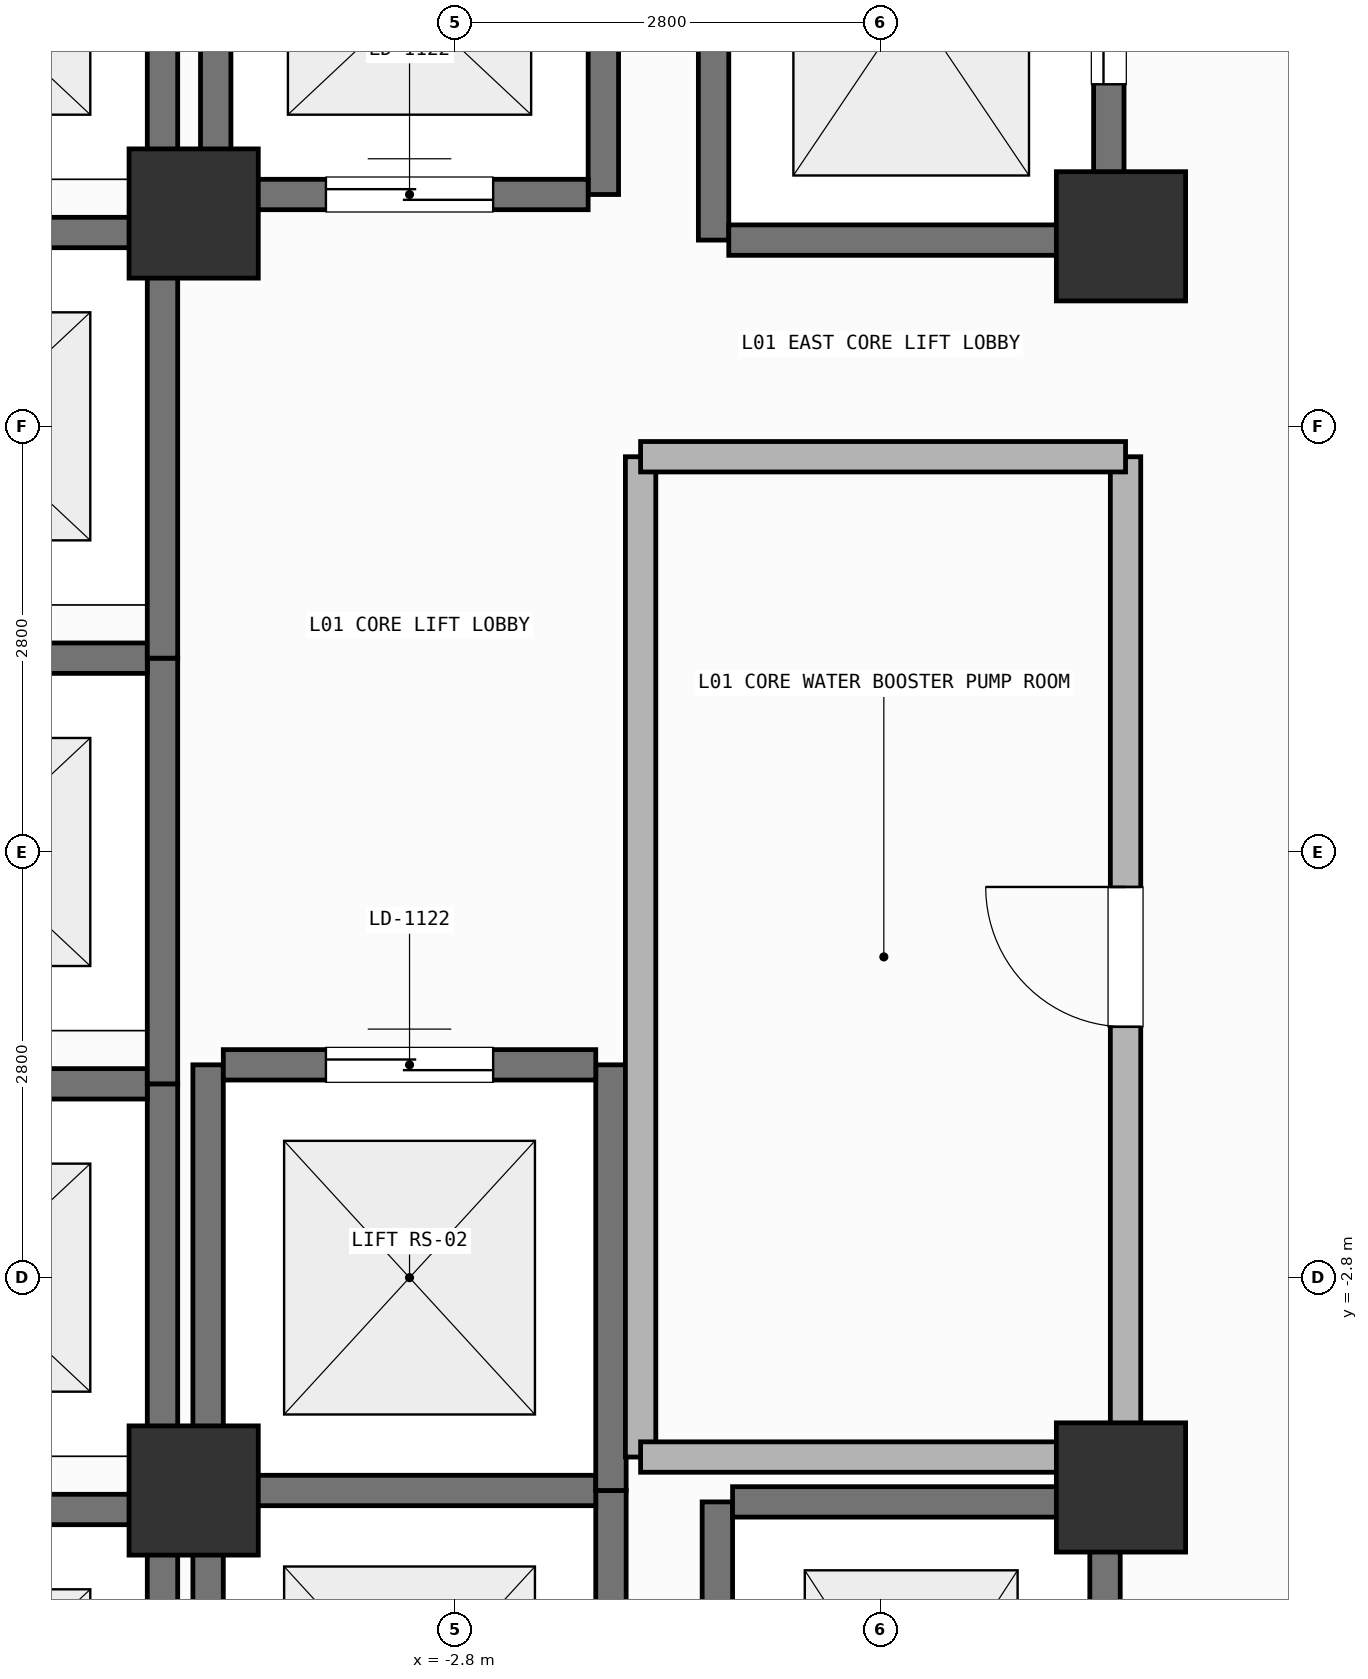
"""IFC4 building model, lengths in metres.
Left out: names, types, materials, properties, quantities, classifications, styles, units other than length and angle.
Written with IfcOpenShell. Run it as: python <this file> out.ifc"""

import sys

from ifc_helpers import new_model, si_unit, direction, frame, frame_2d, origin, origin_2d, place, context, subcontext, project, spatial, rectangle, extrude, element, fill, save


model = new_model("IFC4")
c1 = context("Model", 3, precision=1e-05, world=origin(), true_north=direction((0.0, 1.0)))
c2 = subcontext(c1, "Body", "Model", "MODEL_VIEW")
j1 = project(units=[si_unit("LENGTHUNIT", "METRE"), si_unit("PLANEANGLEUNIT", "RADIAN")], contexts=[c1])
p1 = place(None, origin())
s1 = spatial("IfcSite", under=j1, at=p1, CompositionType="ELEMENT")
p2 = place(p1, origin())
s2 = spatial("IfcBuilding", under=s1, at=p2, CompositionType="ELEMENT")
p3 = place(p2, origin())
s3 = spatial("IfcBuildingStorey", under=s2, at=p3, CompositionType="ELEMENT", Elevation=0.0)
for number, where, z_axis, x_axis in (
    (1, (-4.52, -4.2, 0.0), (0.0, 0.0, 1.0), (1.0, 0.0, 0.0)),
    (2, (1.58, -4.18, 0.0), (0.0, 0.0, 1.0), (1.0, 0.0, 0.0)),
    (3, (1.58, 4.05, 0.0), (0.0, 0.0, 1.0), (1.0, 0.0, 0.0)),
    (4, (-4.52, 4.2, 0.0), (0.0, 0.0, 1.0), (1.0, 0.0, 0.0)),
):
    element("IfcColumn", number, at=place(p3, frame(where, z_axis=z_axis, x_axis=x_axis)), inside=s3, PredefinedType="COLUMN", context=c2, shape_type="SweptSolid", body=[
        extrude(rectangle(XDim=0.85, YDim=0.85, at=origin_2d()), origin(), (0.0, 0.0, 1.0), 4.8),
    ])
p4 = place(p3, frame((-4.725, -6.875, 0.0), z_axis=(0.0, 0.0, 1.0), x_axis=(0.0, 1.0, 0.0)))
e5 = element("IfcWall", 5, at=p4, inside=s3, PredefinedType="SHEAR", context=c2, shape_type="SweptSolid", body=[
    extrude(rectangle(XDim=2.55, YDim=0.2, at=frame_2d((1.275, 0.0))), origin(), (0.0, 0.0, 1.0), 4.56),
])
p5 = place(p3, frame((-7.175, -4.325, 0.0), z_axis=(0.0, 0.0, 1.0), x_axis=(1.0, 0.0, 0.0)))
e6 = element("IfcWall", 6, at=p5, inside=s3, PredefinedType="SHEAR", context=c2, shape_type="SweptSolid", body=[
    extrude(rectangle(XDim=2.35, YDim=0.2, at=frame_2d((1.175, 0.0))), origin(), (0.0, 0.0, 1.0), 4.56),
])
p6 = place(p3, frame((-4.725, -4.325, 0.0), z_axis=(0.0, 0.0, 1.0), x_axis=(0.0, 1.0, 0.0)))
e7 = element("IfcWall", 7, at=p6, inside=s3, PredefinedType="SHEAR", context=c2, shape_type="SweptSolid", body=[
    extrude(rectangle(XDim=2.8, YDim=0.2, at=frame_2d((1.4, 0.0))), origin(), (0.0, 0.0, 1.0), 4.56),
])
p7 = place(p3, frame((-7.175, -1.525, 0.0), z_axis=(0.0, 0.0, 1.0), x_axis=(1.0, 0.0, 0.0)))
e8 = element("IfcWall", 8, at=p7, inside=s3, PredefinedType="SHEAR", context=c2, shape_type="SweptSolid", body=[
    extrude(rectangle(XDim=2.35, YDim=0.2, at=frame_2d((1.175, 0.0))), origin(), (0.0, 0.0, 1.0), 4.56),
])
p8 = place(p3, frame((-4.725, -1.525, 0.0), z_axis=(0.0, 0.0, 1.0), x_axis=(0.0, 1.0, 0.0)))
e9 = element("IfcWall", 9, at=p8, inside=s3, PredefinedType="SHEAR", context=c2, shape_type="SweptSolid", body=[
    extrude(rectangle(XDim=2.8, YDim=0.2, at=frame_2d((1.4, 0.0))), origin(), (0.0, 0.0, 1.0), 4.56),
])
p9 = place(p3, frame((-7.175, 1.275, 0.0), z_axis=(0.0, 0.0, 1.0), x_axis=(1.0, 0.0, 0.0)))
e10 = element("IfcWall", 10, at=p9, inside=s3, PredefinedType="SHEAR", context=c2, shape_type="SweptSolid", body=[
    extrude(rectangle(XDim=2.35, YDim=0.2, at=frame_2d((1.175, 0.0))), origin(), (0.0, 0.0, 1.0), 4.56),
])
p10 = place(p3, frame((-4.725, 1.275, 0.0), z_axis=(0.0, 0.0, 1.0), x_axis=(0.0, 1.0, 0.0)))
e11 = element("IfcWall", 11, at=p10, inside=s3, PredefinedType="SHEAR", context=c2, shape_type="SweptSolid", body=[
    extrude(rectangle(XDim=2.8, YDim=0.2, at=frame_2d((1.4, 0.0))), origin(), (0.0, 0.0, 1.0), 4.56),
])
p11 = place(p3, frame((-7.175, 4.075, 0.0), z_axis=(0.0, 0.0, 1.0), x_axis=(1.0, 0.0, 0.0)))
e12 = element("IfcWall", 12, at=p11, inside=s3, PredefinedType="SHEAR", context=c2, shape_type="SweptSolid", body=[
    extrude(rectangle(XDim=2.35, YDim=0.2, at=frame_2d((1.175, 0.0))), origin(), (0.0, 0.0, 1.0), 4.56),
])
p12 = place(p3, frame((-4.725, 4.075, 0.0), z_axis=(0.0, 0.0, 1.0), x_axis=(0.0, 1.0, 0.0)))
e13 = element("IfcWall", 13, at=p12, inside=s3, PredefinedType="SHEAR", context=c2, shape_type="SweptSolid", body=[
    extrude(rectangle(XDim=2.8, YDim=0.2, at=frame_2d((1.4, 0.0))), origin(), (0.0, 0.0, 1.0), 4.56),
])
for number, where, z_axis, x_axis in (
    (14, (-4.375, 4.325, 0.0), (0.0, 0.0, 1.0), (0.0, 1.0, 0.0)),
    (15, (-1.825, 4.325, 0.0), (0.0, 0.0, 1.0), (0.0, 1.0, 0.0)),
):
    element("IfcWall", number, at=place(p3, frame(where, z_axis=z_axis, x_axis=x_axis)), inside=s3, PredefinedType="SHEAR", context=c2, shape_type="SweptSolid", body=[
        extrude(rectangle(XDim=2.55, YDim=0.2, at=frame_2d((1.275, 0.0))), origin(), (0.0, 0.0, 1.0), 4.56),
    ])
p13 = place(p3, frame((-4.275, 4.325, 0.0), z_axis=(0.0, 0.0, 1.0), x_axis=(1.0, 0.0, 0.0)))
e16 = element("IfcWall", 16, at=p13, inside=s3, PredefinedType="SHEAR", context=c2, shape_type="SweptSolid", body=[
    extrude(rectangle(XDim=2.35, YDim=0.2, at=frame_2d((1.175, 0.0))), origin(), (0.0, 0.0, 1.0), 4.56),
])
p14 = place(p13, frame((0.625, 0.0, 0.0)))
e17 = element("IfcOpeningElement", 17, at=p14, cuts=e16, PredefinedType="OPENING", context=c2, shape_type="SweptSolid", body=[
    extrude(rectangle(XDim=1.1, YDim=2.2, at=frame_2d((0.55, 1.1))), frame((0.0, 0.11, 0.0), z_axis=(0.0, -1.0, 0.0), x_axis=(1.0, 0.0, 0.0)), (0.0, 0.0, 1.0), 0.22),
])
for number, where, z_axis, x_axis in (
    (18, (-4.425, -7.0, 0.0), (0.0, 0.0, 1.0), (0.0, 1.0, 0.0)),
    (19, (-1.775, -7.0, 0.0), (0.0, 0.0, 1.0), (0.0, 1.0, 0.0)),
):
    element("IfcWall", number, at=place(p3, frame(where, z_axis=z_axis, x_axis=x_axis)), inside=s3, PredefinedType="SHEAR", context=c2, shape_type="SweptSolid", body=[
        extrude(rectangle(XDim=2.8, YDim=0.2, at=frame_2d((1.4, 0.0))), origin(), (0.0, 0.0, 1.0), 4.56),
    ])
p15 = place(p3, frame((-4.325, -4.2, 0.0), z_axis=(0.0, 0.0, 1.0), x_axis=(1.0, 0.0, 0.0)))
e20 = element("IfcWall", 20, at=p15, inside=s3, PredefinedType="SHEAR", context=c2, shape_type="SweptSolid", body=[
    extrude(rectangle(XDim=2.45, YDim=0.2, at=frame_2d((1.225, 0.0))), origin(), (0.0, 0.0, 1.0), 4.56),
])
for number, where, z_axis, x_axis in (
    (21, (-4.425, -4.2, 0.0), (0.0, 0.0, 1.0), (0.0, 1.0, 0.0)),
    (22, (-1.775, -4.2, 0.0), (0.0, 0.0, 1.0), (0.0, 1.0, 0.0)),
):
    element("IfcWall", number, at=place(p3, frame(where, z_axis=z_axis, x_axis=x_axis)), inside=s3, PredefinedType="SHEAR", context=c2, shape_type="SweptSolid", body=[
        extrude(rectangle(XDim=2.8, YDim=0.2, at=frame_2d((1.4, 0.0))), origin(), (0.0, 0.0, 1.0), 4.56),
    ])
p16 = place(p3, frame((-4.325, -1.4, 0.0), z_axis=(0.0, 0.0, 1.0), x_axis=(1.0, 0.0, 0.0)))
e23 = element("IfcWall", 23, at=p16, inside=s3, PredefinedType="SHEAR", context=c2, shape_type="SweptSolid", body=[
    extrude(rectangle(XDim=2.45, YDim=0.2, at=frame_2d((1.225, 0.0))), origin(), (0.0, 0.0, 1.0), 4.56),
])
p17 = place(p16, frame((0.675, 0.0, 0.0)))
e24 = element("IfcOpeningElement", 24, at=p17, cuts=e23, PredefinedType="OPENING", context=c2, shape_type="SweptSolid", body=[
    extrude(rectangle(XDim=1.1, YDim=2.2, at=frame_2d((0.55, 1.1))), frame((0.0, 0.11, 0.0), z_axis=(0.0, -1.0, 0.0), x_axis=(1.0, 0.0, 0.0)), (0.0, 0.0, 1.0), 0.22),
])
p18 = place(p3, frame((-1.1, 4.025, 0.0), z_axis=(0.0, 0.0, 1.0), x_axis=(0.0, 1.0, 0.0)))
e25 = element("IfcWall", 25, at=p18, inside=s3, PredefinedType="SHEAR", context=c2, shape_type="SweptSolid", body=[
    extrude(rectangle(XDim=3.15, YDim=0.2, at=frame_2d((1.575, 0.0))), origin(), (0.0, 0.0, 1.0), 4.56),
])
p19 = place(p3, frame((1.5, 4.025, 0.0), z_axis=(0.0, 0.0, 1.0), x_axis=(0.0, 1.0, 0.0)))
e26 = element("IfcWall", 26, at=p19, inside=s3, PredefinedType="SHEAR", context=c2, shape_type="SweptSolid", body=[
    extrude(rectangle(XDim=3.15, YDim=0.2, at=frame_2d((1.575, 0.0))), origin(), (0.0, 0.0, 1.0), 4.56),
])
p20 = place(p19, frame((1.025, 0.0, 0.0)))
e27 = element("IfcOpeningElement", 27, at=p20, cuts=e26, PredefinedType="OPENING", context=c2, shape_type="SweptSolid", body=[
    extrude(rectangle(XDim=1.1, YDim=2.2, at=frame_2d((0.55, 1.1))), frame((0.0, 0.11, 0.0), z_axis=(0.0, -1.0, 0.0), x_axis=(1.0, 0.0, 0.0)), (0.0, 0.0, 1.0), 0.22),
])
p21 = place(p3, frame((-1.0, 4.025, 0.0), z_axis=(0.0, 0.0, 1.0), x_axis=(1.0, 0.0, 0.0)))
e28 = element("IfcWall", 28, at=p21, inside=s3, PredefinedType="SHEAR", context=c2, shape_type="SweptSolid", body=[
    extrude(rectangle(XDim=2.4, YDim=0.2, at=frame_2d((1.2, 0.0))), origin(), (0.0, 0.0, 1.0), 4.56),
])
p22 = place(p3, frame((-1.075, -7.85, 0.0), z_axis=(0.0, 0.0, 1.0), x_axis=(0.0, 1.0, 0.0)))
e29 = element("IfcWall", 29, at=p22, inside=s3, PredefinedType="SHEAR", context=c2, shape_type="SweptSolid", body=[
    extrude(rectangle(XDim=3.575, YDim=0.2, at=frame_2d((1.788, 0.0))), origin(), (0.0, 0.0, 1.0), 4.56),
])
p23 = place(p3, frame((1.475, -7.85, 0.0), z_axis=(0.0, 0.0, 1.0), x_axis=(0.0, 1.0, 0.0)))
e30 = element("IfcWall", 30, at=p23, inside=s3, PredefinedType="SHEAR", context=c2, shape_type="SweptSolid", body=[
    extrude(rectangle(XDim=3.575, YDim=0.2, at=frame_2d((1.788, 0.0))), origin(), (0.0, 0.0, 1.0), 4.56),
])
p24 = place(p23, frame((1.5, 0.0, 0.0)))
e31 = element("IfcOpeningElement", 31, at=p24, cuts=e30, PredefinedType="OPENING", context=c2, shape_type="SweptSolid", body=[
    extrude(rectangle(XDim=1.1, YDim=2.2, at=frame_2d((0.55, 1.1))), frame((0.0, 0.11, 0.0), z_axis=(0.0, -1.0, 0.0), x_axis=(1.0, 0.0, 0.0)), (0.0, 0.0, 1.0), 0.22),
])
p25 = place(p3, frame((-0.975, -4.275, 0.0), z_axis=(0.0, 0.0, 1.0), x_axis=(1.0, 0.0, 0.0)))
e32 = element("IfcWall", 32, at=p25, inside=s3, PredefinedType="SHEAR", context=c2, shape_type="SweptSolid", body=[
    extrude(rectangle(XDim=2.35, YDim=0.2, at=frame_2d((1.175, 0.0))), origin(), (0.0, 0.0, 1.0), 4.56),
])
p26 = place(p3, frame((1.61, -3.98, 0.0), z_axis=(0.0, 0.0, 1.0), x_axis=(0.0, 1.0, 0.0)))
e33 = element("IfcWall", 33, at=p26, inside=s3, PredefinedType="SOLIDWALL", context=c2, shape_type="SweptSolid", body=[
    extrude(rectangle(XDim=6.58, YDim=0.2, at=frame_2d((3.29, 0.0))), origin(), (0.0, 0.0, 1.0), 4.56),
])
p27 = place(p26, frame((2.83, 0.0, 0.0)))
e34 = element("IfcOpeningElement", 34, at=p27, cuts=e33, PredefinedType="OPENING", context=c2, shape_type="SweptSolid", body=[
    extrude(rectangle(XDim=0.92, YDim=2.1, at=frame_2d((0.46, 1.05))), frame((0.0, 0.11, 0.0), z_axis=(0.0, -1.0, 0.0), x_axis=(1.0, 0.0, 0.0)), (0.0, 0.0, 1.0), 0.22),
])
p28 = place(p3, frame((-1.58, -3.98, 0.0), z_axis=(0.0, 0.0, 1.0), x_axis=(0.0, 1.0, 0.0)))
e35 = element("IfcWall", 35, at=p28, inside=s3, PredefinedType="SOLIDWALL", context=c2, shape_type="SweptSolid", body=[
    extrude(rectangle(XDim=6.58, YDim=0.2, at=frame_2d((3.29, 0.0))), origin(), (0.0, 0.0, 1.0), 4.56),
])
for number, where, z_axis, x_axis in (
    (36, (-1.58, -3.98, 0.0), (0.0, 0.0, 1.0), (1.0, 0.0, 0.0)),
    (37, (-1.58, 2.6, 0.0), (0.0, 0.0, 1.0), (1.0, 0.0, 0.0)),
):
    element("IfcWall", number, at=place(p3, frame(where, z_axis=z_axis, x_axis=x_axis)), inside=s3, PredefinedType="SOLIDWALL", context=c2, shape_type="SweptSolid", body=[
        extrude(rectangle(XDim=3.19, YDim=0.2, at=frame_2d((1.595, 0.0))), origin(), (0.0, 0.0, 1.0), 4.56),
    ])
p29 = place(p14, origin())
e38 = element("IfcDoor", 38, at=p29, inside=s3, OperationType="SLIDING_TO_LEFT", PredefinedType="DOOR", context=c2, shape_type="SweptSolid", body=[
    extrude(rectangle(XDim=1.1, YDim=2.2, at=frame_2d((0.55, 1.1))), frame((0.0, 0.025, 0.0), z_axis=(0.0, -1.0, 0.0), x_axis=(1.0, 0.0, 0.0)), (0.0, 0.0, 1.0), 0.05),
])
fill(e17, e38)
p30 = place(p17, origin())
e39 = element("IfcDoor", 39, at=p30, inside=s3, OperationType="SLIDING_TO_LEFT", PredefinedType="DOOR", context=c2, shape_type="SweptSolid", body=[
    extrude(rectangle(XDim=1.1, YDim=2.2, at=frame_2d((0.55, 1.1))), frame((0.0, 0.025, 0.0), z_axis=(0.0, -1.0, 0.0), x_axis=(1.0, 0.0, 0.0)), (0.0, 0.0, 1.0), 0.05),
])
fill(e24, e39)
p31 = place(p20, origin())
e40 = element("IfcDoor", 40, at=p31, inside=s3, OperationType="SLIDING_TO_LEFT", PredefinedType="DOOR", context=c2, shape_type="SweptSolid", body=[
    extrude(rectangle(XDim=1.1, YDim=2.2, at=frame_2d((0.55, 1.1))), frame((0.0, 0.025, 0.0), z_axis=(0.0, -1.0, 0.0), x_axis=(1.0, 0.0, 0.0)), (0.0, 0.0, 1.0), 0.05),
])
fill(e27, e40)
p32 = place(p27, origin())
e41 = element("IfcDoor", 41, at=p32, inside=s3, OperationType="SINGLE_SWING_RIGHT", PredefinedType="DOOR", context=c2, shape_type="SweptSolid", body=[
    extrude(rectangle(XDim=0.92, YDim=2.1, at=frame_2d((0.46, 1.05))), frame((0.0, 0.025, 0.0), z_axis=(0.0, -1.0, 0.0), x_axis=(1.0, 0.0, 0.0)), (0.0, 0.0, 1.0), 0.05),
])
fill(e34, e41)
save(model, sys.argv[1])
